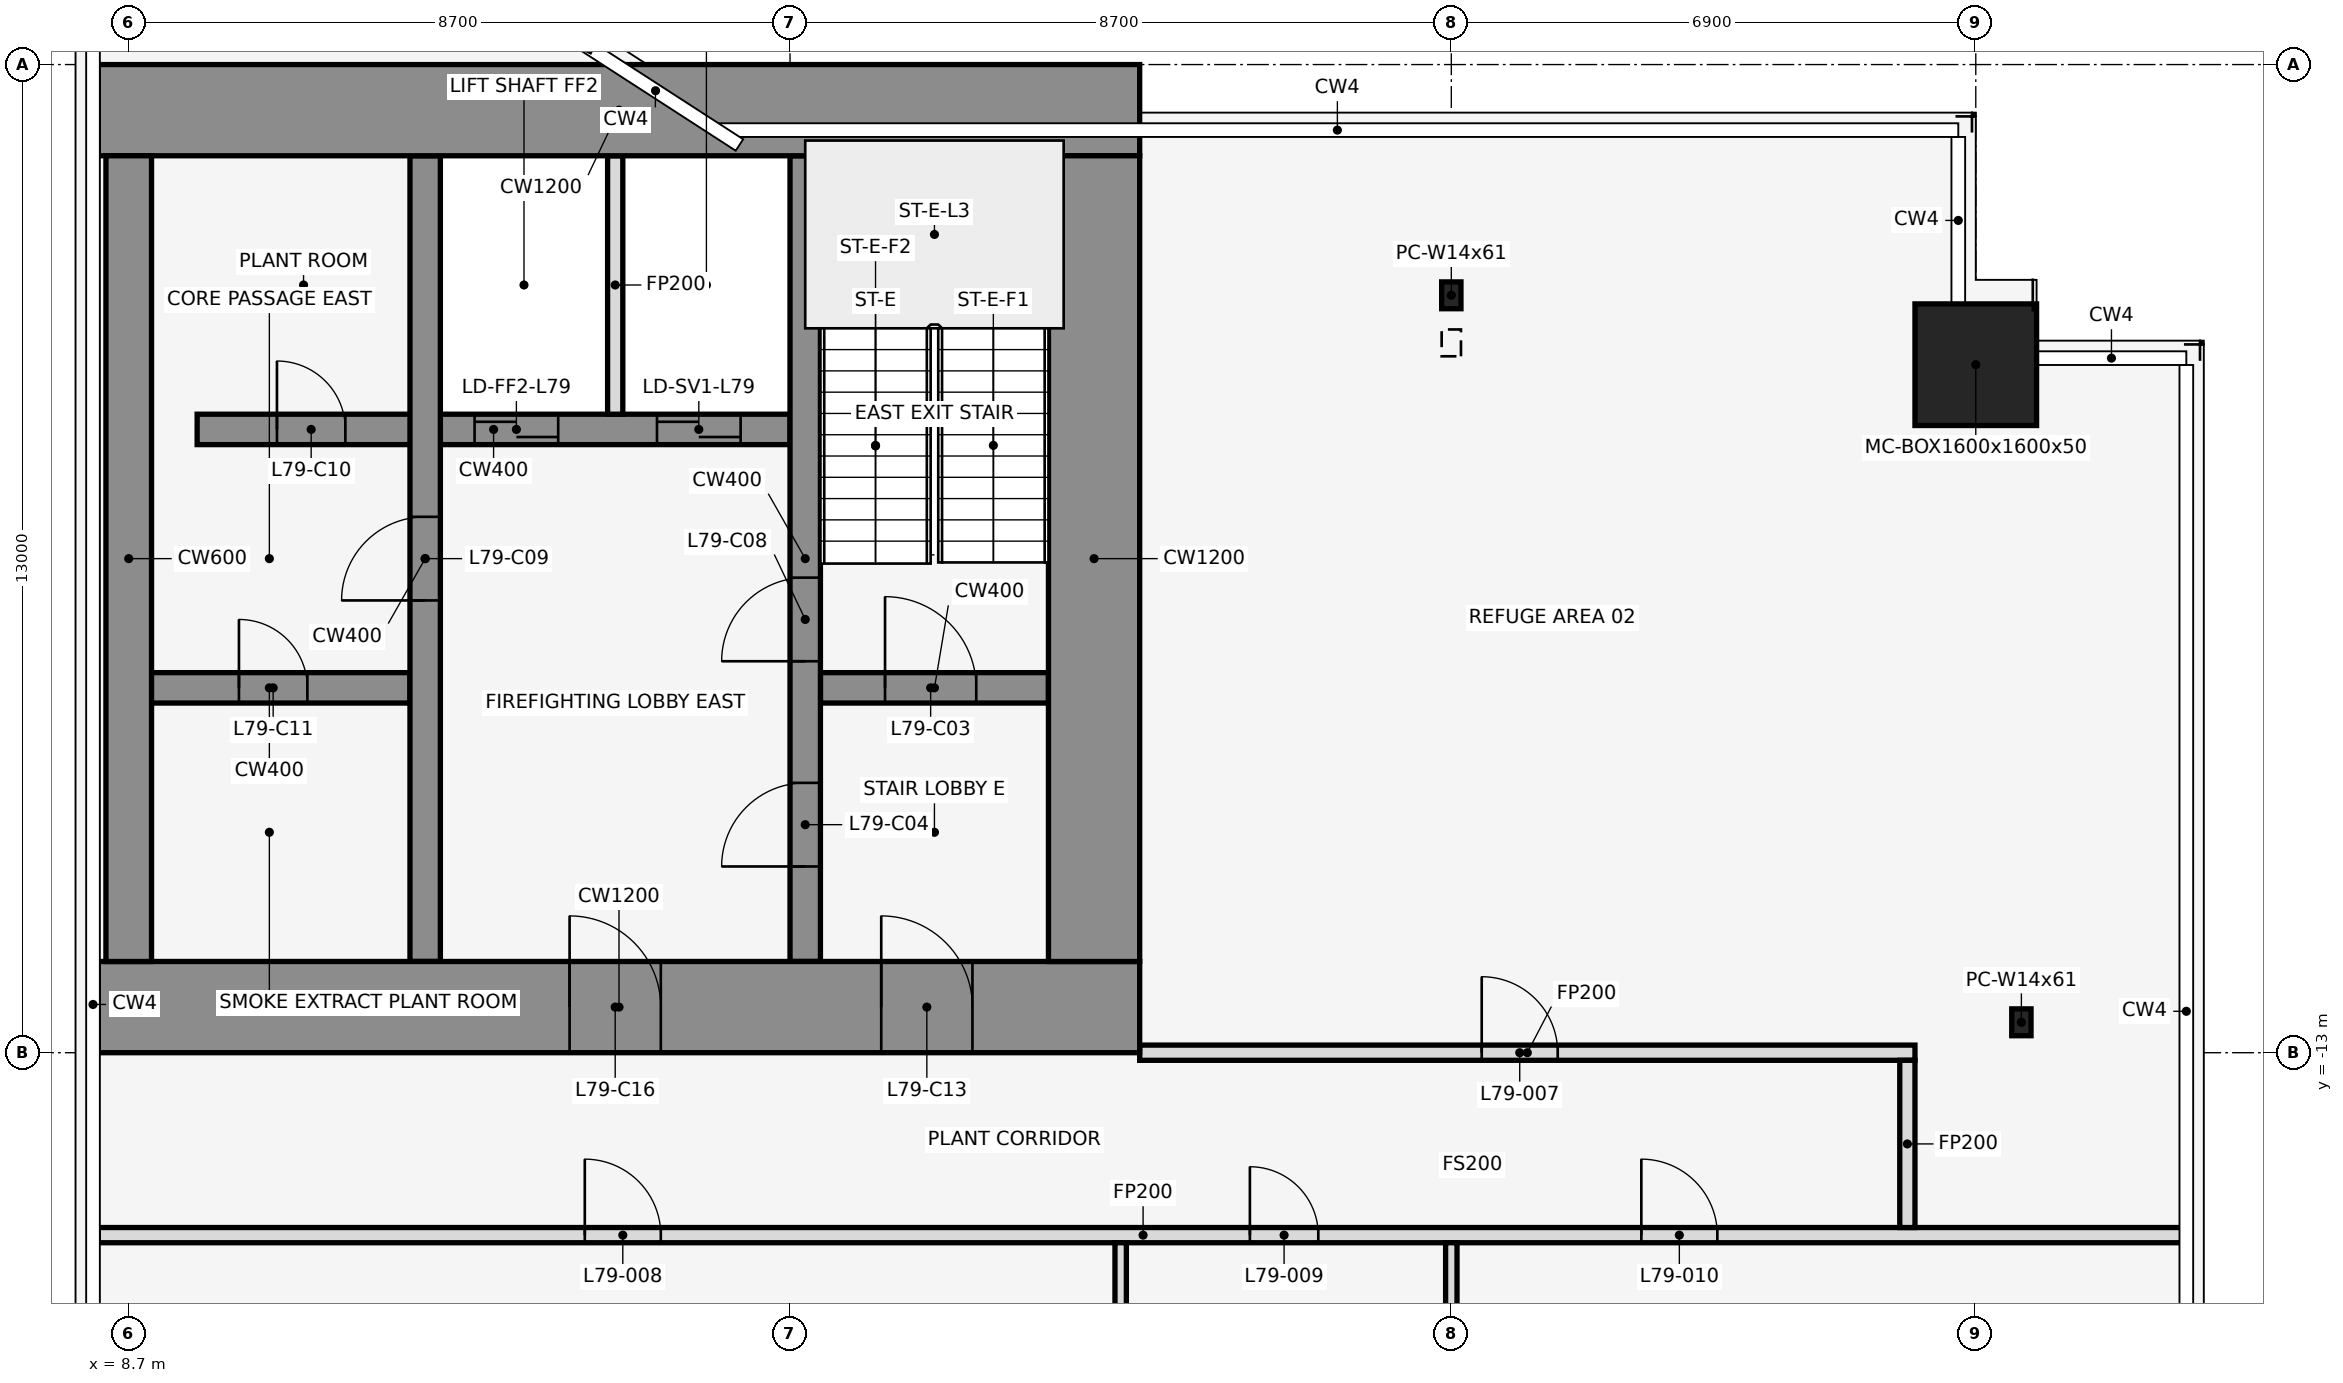
"""IFC4 building model, lengths in metres.
Left out: names, types, materials, properties, quantities, classifications, styles, units other than length and angle.
Written with IfcOpenShell. Run it as: python <this file> out.ifc"""

import sys

from ifc_helpers import new_model, si_unit, direction, frame, frame_2d, origin, origin_2d, place, context, subcontext, project, spatial, rectangle, hollow_rectangle, i_section, extrude, element, fill, save


model = new_model("IFC4")
c1 = context("Model", 3, precision=1e-05, world=origin(), true_north=direction((0.0, 1.0)))
c2 = subcontext(c1, "Body", "Model", "MODEL_VIEW")
j1 = project(units=[si_unit("LENGTHUNIT", "METRE"), si_unit("PLANEANGLEUNIT", "RADIAN")], contexts=[c1])
p1 = place(None, origin())
s1 = spatial("IfcSite", under=j1, at=p1, CompositionType="ELEMENT")
p2 = place(p1, origin())
s2 = spatial("IfcBuilding", under=s1, at=p2, CompositionType="ELEMENT")
p3 = place(p2, frame((0.0, 0.0, 352.4)))
s3 = spatial("IfcBuildingStorey", under=s2, at=p3, CompositionType="ELEMENT", Elevation=352.4)
p4 = place(p3, frame((26.1, -3.036, 0.024), z_axis=(0.0, -0.139200740592, 0.990264183851), x_axis=(1.0, 0.0, 0.0)))
e1 = element("IfcColumn", 1, at=p4, inside=s3, PredefinedType="COLUMN", context=c2, shape_type="SweptSolid", body=[
    extrude(i_section(OverallWidth=0.254, OverallDepth=0.353, WebThickness=0.01, FlangeThickness=0.016, at=origin_2d()), origin(), (0.0, 0.0, 1.0), 4.495),
])
p5 = place(p3, frame((33.0, -3.949, 0.0), z_axis=(0.0, 0.0, 1.0), x_axis=(1.0, 0.0, 0.0)))
e2 = element("IfcColumn", 2, at=p5, inside=s3, PredefinedType="COLUMN", context=c2, shape_type="SweptSolid", body=[
    extrude(hollow_rectangle(XDim=1.6, YDim=1.6, WallThickness=0.05, at=origin_2d()), origin(), (0.0, 0.0, 1.0), 4.5),
])
p6 = place(p3, frame((33.6, -12.6, 0.0), z_axis=(0.0, 0.0, 1.0), x_axis=(1.0, 0.0, 0.0)))
e3 = element("IfcColumn", 3, at=p6, inside=s3, PredefinedType="COLUMN", context=c2, shape_type="SweptSolid", body=[
    extrude(i_section(OverallWidth=0.254, OverallDepth=0.353, WebThickness=0.01, FlangeThickness=0.016, at=origin_2d()), origin(), (0.0, 0.0, 1.0), 4.5),
])
p7 = place(p3, frame((8.3, -15.4, 0.0), z_axis=(0.0, 0.0, 1.0), x_axis=(1.0, 0.0, 0.0)))
e4 = element("IfcWall", 4, at=p7, inside=s3, PredefinedType="PARTITIONING", context=c2, shape_type="SweptSolid", body=[
    extrude(rectangle(XDim=27.49, YDim=0.2, at=frame_2d((13.745, 0.0))), origin(), (0.0, 0.0, 1.0), 3.368),
])
p8 = place(p7, frame((6.4, 0.0, 0.0)))
e5 = element("IfcOpeningElement", 5, at=p8, cuts=e4, PredefinedType="OPENING", context=c2, shape_type="SweptSolid", body=[
    extrude(rectangle(XDim=1.0, YDim=2.1, at=frame_2d((0.5, 1.05))), frame((0.0, 0.112, 0.0), z_axis=(0.0, -1.0, 0.0), x_axis=(1.0, 0.0, 0.0)), (0.0, 0.0, 1.0), 0.224),
])
p9 = place(p7, frame((15.15, 0.0, 0.0)))
e6 = element("IfcOpeningElement", 6, at=p9, cuts=e4, PredefinedType="OPENING", context=c2, shape_type="SweptSolid", body=[
    extrude(rectangle(XDim=0.9, YDim=2.1, at=frame_2d((0.45, 1.05))), frame((0.0, 0.112, 0.0), z_axis=(0.0, -1.0, 0.0), x_axis=(1.0, 0.0, 0.0)), (0.0, 0.0, 1.0), 0.224),
])
p10 = place(p7, frame((20.3, 0.0, 0.0)))
e7 = element("IfcOpeningElement", 7, at=p10, cuts=e4, PredefinedType="OPENING", context=c2, shape_type="SweptSolid", body=[
    extrude(rectangle(XDim=1.0, YDim=2.1, at=frame_2d((0.5, 1.05))), frame((0.0, 0.112, 0.0), z_axis=(0.0, -1.0, 0.0), x_axis=(1.0, 0.0, 0.0)), (0.0, 0.0, 1.0), 0.224),
])
p11 = place(p3, frame((22.0, -13.0, 0.0), z_axis=(0.0, 0.0, 1.0), x_axis=(1.0, 0.0, 0.0)))
e8 = element("IfcWall", 8, at=p11, inside=s3, PredefinedType="PARTITIONING", context=c2, shape_type="SweptSolid", body=[
    extrude(rectangle(XDim=10.2, YDim=0.2, at=frame_2d((5.1, 0.0))), origin(), (0.0, 0.0, 1.0), 3.368),
])
p12 = place(p11, frame((4.5, 0.0, 0.0)))
e9 = element("IfcOpeningElement", 9, at=p12, cuts=e8, PredefinedType="OPENING", context=c2, shape_type="SweptSolid", body=[
    extrude(rectangle(XDim=1.0, YDim=2.1, at=frame_2d((0.5, 1.05))), frame((0.0, 0.112, 0.0), z_axis=(0.0, -1.0, 0.0), x_axis=(1.0, 0.0, 0.0)), (0.0, 0.0, 1.0), 0.224),
])
for number, where, z_axis, x_axis in (
    (10, (21.75, -23.98, 0.0), (0.0, 0.0, 1.0), (0.0, 1.0, 0.0)),
    (11, (26.1, -23.98, 0.0), (0.0, 0.0, 1.0), (0.0, 1.0, 0.0)),
):
    element("IfcWall", number, at=place(p3, frame(where, z_axis=z_axis, x_axis=x_axis)), inside=s3, PredefinedType="PARTITIONING", context=c2, shape_type="SweptSolid", body=[
        extrude(rectangle(XDim=8.48, YDim=0.15, at=frame_2d((4.24, 0.0))), origin(), (0.0, 0.0, 1.0), 3.368),
    ])
p13 = place(p3, frame((32.1, -15.3, 0.0), z_axis=(0.0, 0.0, 1.0), x_axis=(0.0, 1.0, 0.0)))
e12 = element("IfcWall", 12, at=p13, inside=s3, PredefinedType="PARTITIONING", context=c2, shape_type="SweptSolid", body=[
    extrude(rectangle(XDim=2.2, YDim=0.2, at=frame_2d((1.1, 0.0))), origin(), (0.0, 0.0, 1.0), 3.368),
])
p14 = place(p3, frame((8.7, -8.2, 0.0), z_axis=(0.0, 0.0, 1.0), x_axis=(1.0, 0.0, 0.0)))
e13 = element("IfcWall", 13, at=p14, inside=s3, PredefinedType="SHEAR", context=c2, shape_type="SweptSolid", body=[
    extrude(rectangle(XDim=3.7, YDim=0.4, at=frame_2d((1.85, 0.0))), origin(), (0.0, 0.0, 1.0), 4.5),
])
p15 = place(p14, frame((1.45, 0.0, 0.0)))
e14 = element("IfcOpeningElement", 14, at=p15, cuts=e13, PredefinedType="OPENING", context=c2, shape_type="SweptSolid", body=[
    extrude(rectangle(XDim=0.9, YDim=2.1, at=frame_2d((0.45, 1.05))), frame((0.0, 0.212, 0.0), z_axis=(0.0, -1.0, 0.0), x_axis=(1.0, 0.0, 0.0)), (0.0, 0.0, 1.0), 0.424),
])
p16 = place(p3, frame((17.8, -8.2, 0.0), z_axis=(0.0, 0.0, 1.0), x_axis=(1.0, 0.0, 0.0)))
e15 = element("IfcWall", 15, at=p16, inside=s3, PredefinedType="SHEAR", context=c2, shape_type="SweptSolid", body=[
    extrude(rectangle(XDim=3.0, YDim=0.4, at=frame_2d((1.5, 0.0))), origin(), (0.0, 0.0, 1.0), 4.5),
])
p17 = place(p16, frame((0.85, 0.0, 0.0)))
e16 = element("IfcOpeningElement", 16, at=p17, cuts=e15, PredefinedType="OPENING", context=c2, shape_type="SweptSolid", body=[
    extrude(rectangle(XDim=1.2, YDim=2.1, at=frame_2d((0.6, 1.05))), frame((0.0, 0.212, 0.0), z_axis=(0.0, -1.0, 0.0), x_axis=(1.0, 0.0, 0.0)), (0.0, 0.0, 1.0), 0.424),
])
p18 = place(p3, frame((9.6, -4.8, 0.0), z_axis=(0.0, 0.0, 1.0), x_axis=(1.0, 0.0, 0.0)))
e17 = element("IfcWall", 17, at=p18, inside=s3, PredefinedType="SHEAR", context=c2, shape_type="SweptSolid", body=[
    extrude(rectangle(XDim=7.8, YDim=0.4, at=frame_2d((3.9, 0.0))), origin(), (0.0, 0.0, 1.0), 4.5),
])
p19 = place(p18, frame((3.65, 0.0, 0.0)))
e18 = element("IfcOpeningElement", 18, at=p19, cuts=e17, PredefinedType="OPENING", context=c2, shape_type="SweptSolid", body=[
    extrude(rectangle(XDim=1.1, YDim=2.1, at=frame_2d((0.55, 1.05))), frame((0.0, 0.212, 0.0), z_axis=(0.0, -1.0, 0.0), x_axis=(1.0, 0.0, 0.0)), (0.0, 0.0, 1.0), 0.424),
])
p20 = place(p18, frame((6.05, 0.0, 0.0)))
e19 = element("IfcOpeningElement", 19, at=p20, cuts=e17, PredefinedType="OPENING", context=c2, shape_type="SweptSolid", body=[
    extrude(rectangle(XDim=1.1, YDim=2.1, at=frame_2d((0.55, 1.05))), frame((0.0, 0.212, 0.0), z_axis=(0.0, -1.0, 0.0), x_axis=(1.0, 0.0, 0.0)), (0.0, 0.0, 1.0), 0.424),
])
p21 = place(p18, frame((1.05, 0.0, 0.0)))
e20 = element("IfcOpeningElement", 20, at=p21, cuts=e17, PredefinedType="OPENING", context=c2, shape_type="SweptSolid", body=[
    extrude(rectangle(XDim=0.9, YDim=2.1, at=frame_2d((0.45, 1.05))), frame((0.0, 0.212, 0.0), z_axis=(0.0, -1.0, 0.0), x_axis=(1.0, 0.0, 0.0)), (0.0, 0.0, 1.0), 0.424),
])
p22 = place(p3, frame((12.6, -11.8, 0.0), z_axis=(0.0, 0.0, 1.0), x_axis=(0.0, 1.0, 0.0)))
e21 = element("IfcWall", 21, at=p22, inside=s3, PredefinedType="SHEAR", context=c2, shape_type="SweptSolid", body=[
    extrude(rectangle(XDim=10.6, YDim=0.4, at=frame_2d((5.3, 0.0))), origin(), (0.0, 0.0, 1.0), 4.5),
])
p23 = place(p22, frame((4.75, 0.0, 0.0)))
e22 = element("IfcOpeningElement", 22, at=p23, cuts=e21, PredefinedType="OPENING", context=c2, shape_type="SweptSolid", body=[
    extrude(rectangle(XDim=1.1, YDim=2.1, at=frame_2d((0.55, 1.05))), frame((0.0, 0.212, 0.0), z_axis=(0.0, -1.0, 0.0), x_axis=(1.0, 0.0, 0.0)), (0.0, 0.0, 1.0), 0.424),
])
p24 = place(p3, frame((15.1, -4.6, 0.0), z_axis=(0.0, 0.0, 1.0), x_axis=(0.0, 1.0, 0.0)))
e23 = element("IfcWall", 23, at=p24, inside=s3, PredefinedType="PARTITIONING", context=c2, shape_type="SweptSolid", body=[
    extrude(rectangle(XDim=3.4, YDim=0.2, at=frame_2d((1.7, 0.0))), origin(), (0.0, 0.0, 1.0), 3.368),
])
p25 = place(p3, frame((17.6, -11.8, 0.0), z_axis=(0.0, 0.0, 1.0), x_axis=(0.0, 1.0, 0.0)))
e24 = element("IfcWall", 24, at=p25, inside=s3, PredefinedType="SHEAR", context=c2, shape_type="SweptSolid", body=[
    extrude(rectangle(XDim=10.6, YDim=0.4, at=frame_2d((5.3, 0.0))), origin(), (0.0, 0.0, 1.0), 4.5),
])
p26 = place(p25, frame((1.25, 0.0, 0.0)))
e25 = element("IfcOpeningElement", 25, at=p26, cuts=e24, PredefinedType="OPENING", context=c2, shape_type="SweptSolid", body=[
    extrude(rectangle(XDim=1.1, YDim=2.1, at=frame_2d((0.55, 1.05))), frame((0.0, 0.212, 0.0), z_axis=(0.0, -1.0, 0.0), x_axis=(1.0, 0.0, 0.0)), (0.0, 0.0, 1.0), 0.424),
])
p27 = place(p25, frame((3.95, 0.0, 0.0)))
e26 = element("IfcOpeningElement", 26, at=p27, cuts=e24, PredefinedType="OPENING", context=c2, shape_type="SweptSolid", body=[
    extrude(rectangle(XDim=1.1, YDim=2.1, at=frame_2d((0.55, 1.05))), frame((0.0, 0.212, 0.0), z_axis=(0.0, -1.0, 0.0), x_axis=(1.0, 0.0, 0.0)), (0.0, 0.0, 1.0), 0.424),
])
p28 = place(p3, frame((8.3, -0.6, 0.0), z_axis=(0.0, 0.0, 1.0), x_axis=(1.0, 0.0, 0.0)))
e27 = element("IfcWall", 27, at=p28, inside=s3, PredefinedType="SHEAR", context=c2, shape_type="SweptSolid", body=[
    extrude(rectangle(XDim=13.7, YDim=1.2, at=frame_2d((6.85, 0.0))), origin(), (0.0, 0.0, 1.0), 4.5),
])
p29 = place(p3, frame((8.3, -12.4, 0.0), z_axis=(0.0, 0.0, 1.0), x_axis=(1.0, 0.0, 0.0)))
e28 = element("IfcWall", 28, at=p29, inside=s3, PredefinedType="SHEAR", context=c2, shape_type="SweptSolid", body=[
    extrude(rectangle(XDim=13.7, YDim=1.2, at=frame_2d((6.85, 0.0))), origin(), (0.0, 0.0, 1.0), 4.5),
])
p30 = place(p29, frame((10.3, 0.0, 0.0)))
e29 = element("IfcOpeningElement", 29, at=p30, cuts=e28, PredefinedType="OPENING", context=c2, shape_type="SweptSolid", body=[
    extrude(rectangle(XDim=1.2, YDim=2.1, at=frame_2d((0.6, 1.05))), frame((0.0, 0.612, 0.0), z_axis=(0.0, -1.0, 0.0), x_axis=(1.0, 0.0, 0.0)), (0.0, 0.0, 1.0), 1.224),
])
p31 = place(p29, frame((6.2, 0.0, 0.0)))
e30 = element("IfcOpeningElement", 30, at=p31, cuts=e28, PredefinedType="OPENING", context=c2, shape_type="SweptSolid", body=[
    extrude(rectangle(XDim=1.2, YDim=2.1, at=frame_2d((0.6, 1.05))), frame((0.0, 0.612, 0.0), z_axis=(0.0, -1.0, 0.0), x_axis=(1.0, 0.0, 0.0)), (0.0, 0.0, 1.0), 1.224),
])
p32 = place(p3, frame((21.4, -11.8, 0.0), z_axis=(0.0, 0.0, 1.0), x_axis=(0.0, 1.0, 0.0)))
e31 = element("IfcWall", 31, at=p32, inside=s3, PredefinedType="SHEAR", context=c2, shape_type="SweptSolid", body=[
    extrude(rectangle(XDim=10.6, YDim=1.2, at=frame_2d((5.3, 0.0))), origin(), (0.0, 0.0, 1.0), 4.5),
])
p33 = place(p3, frame((8.7, -11.8, 0.0), z_axis=(0.0, 0.0, 1.0), x_axis=(0.0, 1.0, 0.0)))
e32 = element("IfcWall", 32, at=p33, inside=s3, PredefinedType="SHEAR", context=c2, shape_type="SweptSolid", body=[
    extrude(rectangle(XDim=10.6, YDim=0.6, at=frame_2d((5.3, 0.0))), origin(), (0.0, 0.0, 1.0), 4.5),
])
p34 = place(p12, origin())
e33 = element("IfcDoor", 33, at=p34, inside=s3, OperationType="SINGLE_SWING_LEFT", PredefinedType="DOOR", context=c2, shape_type="SweptSolid", body=[
    extrude(rectangle(XDim=1.0, YDim=2.1, at=frame_2d((0.5, 1.05))), frame((0.0, 0.025, 0.0), z_axis=(0.0, -1.0, 0.0), x_axis=(1.0, 0.0, 0.0)), (0.0, 0.0, 1.0), 0.05),
])
fill(e9, e33)
p35 = place(p8, frame((1.0, 0.0, 0.0), z_axis=(0.0, 0.0, 1.0), x_axis=(-1.0, 0.0, 0.0)))
e34 = element("IfcDoor", 34, at=p35, inside=s3, OperationType="SINGLE_SWING_RIGHT", PredefinedType="DOOR", context=c2, shape_type="SweptSolid", body=[
    extrude(rectangle(XDim=1.0, YDim=2.1, at=frame_2d((0.5, 1.05))), frame((0.0, 0.025, 0.0), z_axis=(0.0, -1.0, 0.0), x_axis=(1.0, 0.0, 0.0)), (0.0, 0.0, 1.0), 0.05),
])
fill(e5, e34)
p36 = place(p9, frame((0.9, 0.0, 0.0), z_axis=(0.0, 0.0, 1.0), x_axis=(-1.0, 0.0, 0.0)))
e35 = element("IfcDoor", 35, at=p36, inside=s3, OperationType="SINGLE_SWING_RIGHT", PredefinedType="DOOR", context=c2, shape_type="SweptSolid", body=[
    extrude(rectangle(XDim=0.9, YDim=2.1, at=frame_2d((0.45, 1.05))), frame((0.0, 0.025, 0.0), z_axis=(0.0, -1.0, 0.0), x_axis=(1.0, 0.0, 0.0)), (0.0, 0.0, 1.0), 0.05),
])
fill(e6, e35)
p37 = place(p10, frame((1.0, 0.0, 0.0), z_axis=(0.0, 0.0, 1.0), x_axis=(-1.0, 0.0, 0.0)))
e36 = element("IfcDoor", 36, at=p37, inside=s3, OperationType="SINGLE_SWING_LEFT", PredefinedType="DOOR", context=c2, shape_type="SweptSolid", body=[
    extrude(rectangle(XDim=1.0, YDim=2.1, at=frame_2d((0.5, 1.05))), frame((0.0, 0.025, 0.0), z_axis=(0.0, -1.0, 0.0), x_axis=(1.0, 0.0, 0.0)), (0.0, 0.0, 1.0), 0.05),
])
fill(e7, e36)
p38 = place(p17, origin())
e37 = element("IfcDoor", 37, at=p38, inside=s3, OperationType="SINGLE_SWING_LEFT", PredefinedType="DOOR", context=c2, shape_type="SweptSolid", body=[
    extrude(rectangle(XDim=1.2, YDim=2.1, at=frame_2d((0.6, 1.05))), frame((0.0, 0.025, 0.0), z_axis=(0.0, -1.0, 0.0), x_axis=(1.0, 0.0, 0.0)), (0.0, 0.0, 1.0), 0.05),
])
fill(e16, e37)
p39 = place(p26, origin())
e38 = element("IfcDoor", 38, at=p39, inside=s3, OperationType="SINGLE_SWING_RIGHT", PredefinedType="DOOR", context=c2, shape_type="SweptSolid", body=[
    extrude(rectangle(XDim=1.1, YDim=2.1, at=frame_2d((0.55, 1.05))), frame((0.0, 0.025, 0.0), z_axis=(0.0, -1.0, 0.0), x_axis=(1.0, 0.0, 0.0)), (0.0, 0.0, 1.0), 0.05),
])
fill(e25, e38)
p40 = place(p19, origin())
e39 = element("IfcDoor", 39, at=p40, inside=s3, OperationType="DOUBLE_DOOR_SLIDING", PredefinedType="DOOR", context=c2, shape_type="SweptSolid", body=[
    extrude(rectangle(XDim=1.1, YDim=2.1, at=frame_2d((0.55, 1.05))), frame((0.0, 0.025, 0.0), z_axis=(0.0, -1.0, 0.0), x_axis=(1.0, 0.0, 0.0)), (0.0, 0.0, 1.0), 0.05),
])
fill(e18, e39)
p41 = place(p20, origin())
e40 = element("IfcDoor", 40, at=p41, inside=s3, OperationType="DOUBLE_DOOR_SLIDING", PredefinedType="DOOR", context=c2, shape_type="SweptSolid", body=[
    extrude(rectangle(XDim=1.1, YDim=2.1, at=frame_2d((0.55, 1.05))), frame((0.0, 0.025, 0.0), z_axis=(0.0, -1.0, 0.0), x_axis=(1.0, 0.0, 0.0)), (0.0, 0.0, 1.0), 0.05),
])
fill(e19, e40)
p42 = place(p27, origin())
e41 = element("IfcDoor", 41, at=p42, inside=s3, OperationType="SINGLE_SWING_RIGHT", PredefinedType="DOOR", context=c2, shape_type="SweptSolid", body=[
    extrude(rectangle(XDim=1.1, YDim=2.1, at=frame_2d((0.55, 1.05))), frame((0.0, 0.025, 0.0), z_axis=(0.0, -1.0, 0.0), x_axis=(1.0, 0.0, 0.0)), (0.0, 0.0, 1.0), 0.05),
])
fill(e26, e41)
p43 = place(p23, frame((1.1, 0.0, 0.0), z_axis=(0.0, 0.0, 1.0), x_axis=(-1.0, 0.0, 0.0)))
e42 = element("IfcDoor", 42, at=p43, inside=s3, OperationType="SINGLE_SWING_RIGHT", PredefinedType="DOOR", context=c2, shape_type="SweptSolid", body=[
    extrude(rectangle(XDim=1.1, YDim=2.1, at=frame_2d((0.55, 1.05))), frame((0.0, 0.025, 0.0), z_axis=(0.0, -1.0, 0.0), x_axis=(1.0, 0.0, 0.0)), (0.0, 0.0, 1.0), 0.05),
])
fill(e22, e42)
p44 = place(p21, origin())
e43 = element("IfcDoor", 43, at=p44, inside=s3, OperationType="SINGLE_SWING_RIGHT", PredefinedType="DOOR", context=c2, shape_type="SweptSolid", body=[
    extrude(rectangle(XDim=0.9, YDim=2.1, at=frame_2d((0.45, 1.05))), frame((0.0, 0.025, 0.0), z_axis=(0.0, -1.0, 0.0), x_axis=(1.0, 0.0, 0.0)), (0.0, 0.0, 1.0), 0.05),
])
fill(e20, e43)
p45 = place(p15, frame((0.9, 0.0, 0.0), z_axis=(0.0, 0.0, 1.0), x_axis=(-1.0, 0.0, 0.0)))
e44 = element("IfcDoor", 44, at=p45, inside=s3, OperationType="SINGLE_SWING_RIGHT", PredefinedType="DOOR", context=c2, shape_type="SweptSolid", body=[
    extrude(rectangle(XDim=0.9, YDim=2.1, at=frame_2d((0.45, 1.05))), frame((0.0, 0.025, 0.0), z_axis=(0.0, -1.0, 0.0), x_axis=(1.0, 0.0, 0.0)), (0.0, 0.0, 1.0), 0.05),
])
fill(e14, e44)
p46 = place(p30, frame((1.2, 0.0, 0.0), z_axis=(0.0, 0.0, 1.0), x_axis=(-1.0, 0.0, 0.0)))
e45 = element("IfcDoor", 45, at=p46, inside=s3, OperationType="SINGLE_SWING_RIGHT", PredefinedType="DOOR", context=c2, shape_type="SweptSolid", body=[
    extrude(rectangle(XDim=1.2, YDim=2.1, at=frame_2d((0.6, 1.05))), frame((0.0, 0.025, 0.0), z_axis=(0.0, -1.0, 0.0), x_axis=(1.0, 0.0, 0.0)), (0.0, 0.0, 1.0), 0.05),
])
fill(e29, e45)
p47 = place(p31, frame((1.2, 0.0, 0.0), z_axis=(0.0, 0.0, 1.0), x_axis=(-1.0, 0.0, 0.0)))
e46 = element("IfcDoor", 46, at=p47, inside=s3, OperationType="SINGLE_SWING_RIGHT", PredefinedType="DOOR", context=c2, shape_type="SweptSolid", body=[
    extrude(rectangle(XDim=1.2, YDim=2.1, at=frame_2d((0.6, 1.05))), frame((0.0, 0.025, 0.0), z_axis=(0.0, -1.0, 0.0), x_axis=(1.0, 0.0, 0.0)), (0.0, 0.0, 1.0), 0.05),
])
fill(e30, e46)
save(model, sys.argv[1])
